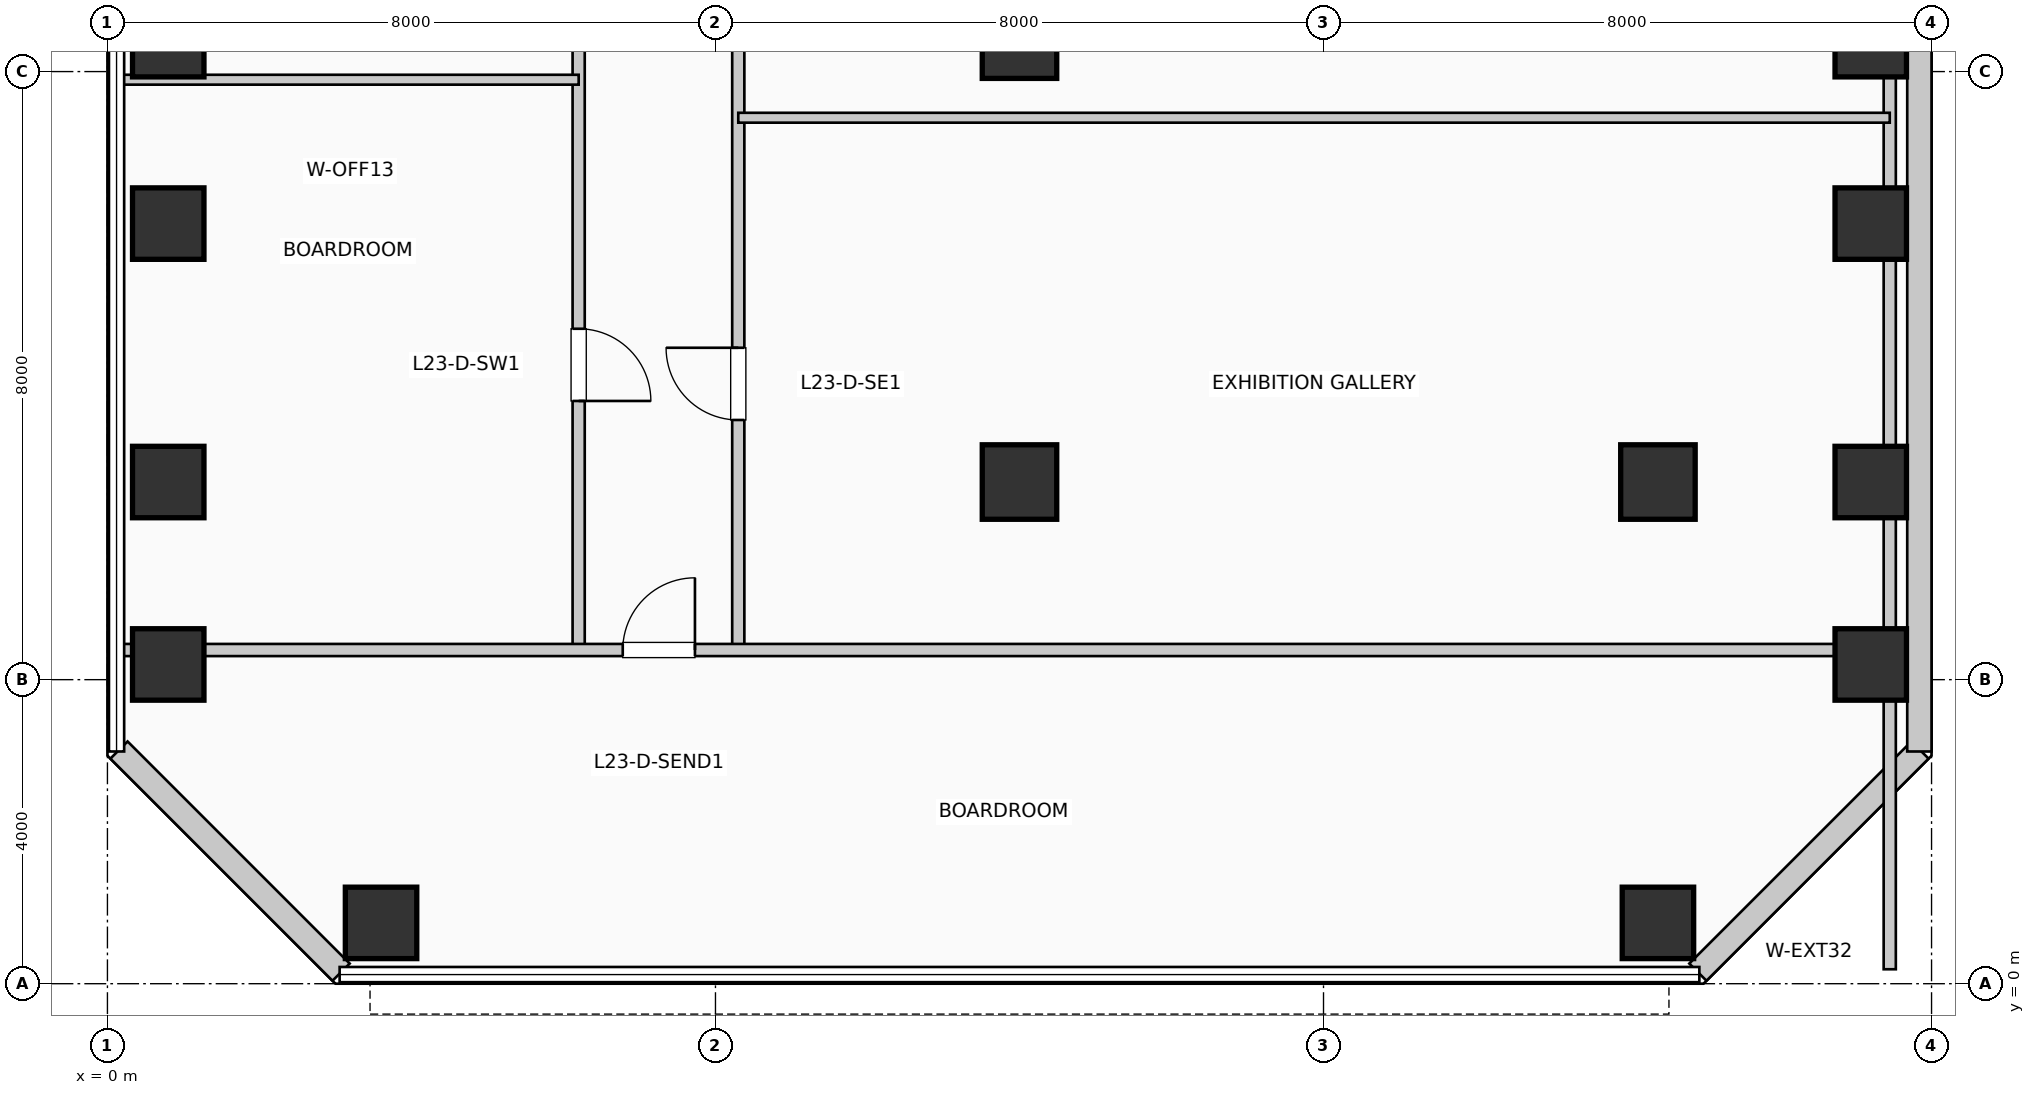
"""IFC4 building model, lengths in metres.
Left out: names, types, materials, properties, quantities, classifications, styles, units other than length and angle.
Written with IfcOpenShell. Run it as: python <this file> out.ifc"""

import sys

from ifc_helpers import new_model, si_unit, direction, frame, frame_2d, origin, origin_2d, place, context, subcontext, project, spatial, rectangle, extrude, element, fill, save


model = new_model("IFC4")
c1 = context("Model", 3, precision=1e-05, world=origin(), true_north=direction((0.0, 1.0)))
c2 = subcontext(c1, "Body", "Model", "MODEL_VIEW")
j1 = project(units=[si_unit("LENGTHUNIT", "METRE"), si_unit("PLANEANGLEUNIT", "RADIAN")], contexts=[c1])
p1 = place(None, origin())
s1 = spatial("IfcSite", under=j1, at=p1, CompositionType="ELEMENT")
p2 = place(p1, origin())
s2 = spatial("IfcBuilding", under=s1, at=p2, CompositionType="ELEMENT")
p3 = place(p2, frame((0.0, 0.0, 98.67)))
s3 = spatial("IfcBuildingStorey", under=s2, at=p3, CompositionType="ELEMENT", Elevation=98.67)
for number, where, z_axis, x_axis in (
    (1, (0.8, 4.2, 0.0), (0.0, 0.0, 1.0), (1.0, 0.0, 0.0)),
    (2, (0.8, 6.6, 0.0), (0.0, 0.0, 1.0), (1.0, 0.0, 0.0)),
    (3, (0.8, 10.0, 0.0), (0.0, 0.0, 1.0), (1.0, 0.0, 0.0)),
    (4, (0.8, 12.4, 0.0), (0.0, 0.0, 1.0), (1.0, 0.0, 0.0)),
    (5, (3.6, 0.8, 0.0), (0.0, 0.0, 1.0), (1.0, 0.0, 0.0)),
):
    element("IfcColumn", number, at=place(p3, frame(where, z_axis=z_axis, x_axis=x_axis)), inside=s3, PredefinedType="COLUMN", context=c2, shape_type="SweptSolid", body=[
        extrude(rectangle(XDim=0.94, YDim=0.94, at=origin_2d()), origin(), (0.0, 0.0, 1.0), 3.96),
    ])
for number, where, z_axis, x_axis in (
    (6, (12.0, 6.6, 0.0), (0.0, 0.0, 1.0), (1.0, 0.0, 0.0)),
    (7, (12.0, 12.4, 0.0), (0.0, 0.0, 1.0), (1.0, 0.0, 0.0)),
):
    element("IfcColumn", number, at=place(p3, frame(where, z_axis=z_axis, x_axis=x_axis)), inside=s3, PredefinedType="COLUMN", context=c2, shape_type="SweptSolid", body=[
        extrude(rectangle(XDim=0.98, YDim=0.98, at=origin_2d()), origin(), (0.0, 0.0, 1.0), 3.96),
    ])
p4 = place(p3, frame((20.4, 0.8, 0.0), z_axis=(0.0, 0.0, 1.0), x_axis=(1.0, 0.0, 0.0)))
e8 = element("IfcColumn", 8, at=p4, inside=s3, PredefinedType="COLUMN", context=c2, shape_type="SweptSolid", body=[
    extrude(rectangle(XDim=0.94, YDim=0.94, at=origin_2d()), origin(), (0.0, 0.0, 1.0), 3.96),
])
p5 = place(p3, frame((20.4, 6.6, 0.0), z_axis=(0.0, 0.0, 1.0), x_axis=(1.0, 0.0, 0.0)))
e9 = element("IfcColumn", 9, at=p5, inside=s3, PredefinedType="COLUMN", context=c2, shape_type="SweptSolid", body=[
    extrude(rectangle(XDim=0.98, YDim=0.98, at=origin_2d()), origin(), (0.0, 0.0, 1.0), 3.96),
])
for number, where, z_axis, x_axis in (
    (10, (23.2, 4.2, 0.0), (0.0, 0.0, 1.0), (1.0, 0.0, 0.0)),
    (11, (23.2, 6.6, 0.0), (0.0, 0.0, 1.0), (1.0, 0.0, 0.0)),
    (12, (23.2, 10.0, 0.0), (0.0, 0.0, 1.0), (1.0, 0.0, 0.0)),
    (13, (23.2, 12.4, 0.0), (0.0, 0.0, 1.0), (1.0, 0.0, 0.0)),
):
    element("IfcColumn", number, at=place(p3, frame(where, z_axis=z_axis, x_axis=x_axis)), inside=s3, PredefinedType="COLUMN", context=c2, shape_type="SweptSolid", body=[
        extrude(rectangle(XDim=0.94, YDim=0.94, at=origin_2d()), origin(), (0.0, 0.0, 1.0), 3.96),
    ])
p6 = place(p3, frame((20.926, 0.152, 0.0), z_axis=(0.0, 0.0, 1.0), x_axis=(0.707106781187, 0.707106781187, 0.0)))
e14 = element("IfcWall", 14, at=p6, inside=s3, PredefinedType="SOLIDWALL", context=c2, shape_type="SweptSolid", body=[
    extrude(rectangle(XDim=4.133, YDim=0.32, at=frame_2d((2.066, 0.0))), origin(), (0.0, 0.0, 1.0), 3.71),
])
p7 = place(p3, frame((23.84, 3.055, 0.0), z_axis=(0.0, 0.0, 1.0), x_axis=(0.0, 1.0, 0.0)))
e15 = element("IfcWall", 15, at=p7, inside=s3, PredefinedType="SOLIDWALL", context=c2, shape_type="SweptSolid", body=[
    extrude(rectangle(XDim=12.89, YDim=0.32, at=frame_2d((6.445, 0.0))), origin(), (0.0, 0.0, 1.0), 3.71),
])
p8 = place(p3, frame((0.152, 3.074, 0.0), z_axis=(0.0, 0.0, 1.0), x_axis=(0.707106781187, -0.707106781187, 0.0)))
e16 = element("IfcWall", 16, at=p8, inside=s3, PredefinedType="SOLIDWALL", context=c2, shape_type="SweptSolid", body=[
    extrude(rectangle(XDim=4.133, YDim=0.32, at=frame_2d((2.066, 0.0))), origin(), (0.0, 0.0, 1.0), 3.71),
])
p9 = place(p3, frame((6.2, 4.39, 0.0), z_axis=(0.0, 0.0, 1.0), x_axis=(0.0, 1.0, 0.0)))
e17 = element("IfcWall", 17, at=p9, inside=s3, PredefinedType="PARTITIONING", context=c2, shape_type="SweptSolid", body=[
    extrude(rectangle(XDim=25.01, YDim=0.16, at=frame_2d((12.505, 0.0))), origin(), (0.0, 0.0, 1.0), 3.71),
])
p10 = place(p9, frame((4.227, 0.0, 0.0), z_axis=(0.0, 0.0, 1.0), x_axis=(-1.0, 0.0, 0.0)))
e18 = element("IfcOpeningElement", 18, at=p10, cuts=e17, PredefinedType="OPENING", context=c2, shape_type="SweptSolid", body=[
    extrude(rectangle(XDim=0.95, YDim=2.15, at=frame_2d((0.475, 1.075))), frame((0.0, 0.09, 0.0), z_axis=(0.0, -1.0, 0.0), x_axis=(1.0, 0.0, 0.0)), (0.0, 0.0, 1.0), 0.18),
])
p11 = place(p9, frame((11.979, 0.0, 0.0), z_axis=(0.0, 0.0, 1.0), x_axis=(-1.0, 0.0, 0.0)))
e19 = element("IfcOpeningElement", 19, at=p11, cuts=e17, PredefinedType="OPENING", context=c2, shape_type="SweptSolid", body=[
    extrude(rectangle(XDim=0.95, YDim=2.15, at=frame_2d((0.475, 1.075))), frame((0.0, 0.09, 0.0), z_axis=(0.0, -1.0, 0.0), x_axis=(1.0, 0.0, 0.0)), (0.0, 0.0, 1.0), 0.18),
])
p12 = place(p9, frame((20.733, 0.0, 0.0), z_axis=(0.0, 0.0, 1.0), x_axis=(-1.0, 0.0, 0.0)))
e20 = element("IfcOpeningElement", 20, at=p12, cuts=e17, PredefinedType="OPENING", context=c2, shape_type="SweptSolid", body=[
    extrude(rectangle(XDim=0.95, YDim=2.15, at=frame_2d((0.475, 1.075))), frame((0.0, 0.09, 0.0), z_axis=(0.0, -1.0, 0.0), x_axis=(1.0, 0.0, 0.0)), (0.0, 0.0, 1.0), 0.18),
])
p13 = place(p3, frame((8.3, 4.39, 0.0), z_axis=(0.0, 0.0, 1.0), x_axis=(0.0, 1.0, 0.0)))
e21 = element("IfcWall", 21, at=p13, inside=s3, PredefinedType="PARTITIONING", context=c2, shape_type="SweptSolid", body=[
    extrude(rectangle(XDim=25.01, YDim=0.16, at=frame_2d((12.505, 0.0))), origin(), (0.0, 0.0, 1.0), 3.71),
])
p14 = place(p13, frame((3.026, 0.0, 0.0)))
e22 = element("IfcOpeningElement", 22, at=p14, cuts=e21, PredefinedType="OPENING", context=c2, shape_type="SweptSolid", body=[
    extrude(rectangle(XDim=0.95, YDim=2.15, at=frame_2d((0.475, 1.075))), frame((0.0, 0.09, 0.0), z_axis=(0.0, -1.0, 0.0), x_axis=(1.0, 0.0, 0.0)), (0.0, 0.0, 1.0), 0.18),
])
p15 = place(p13, frame((10.529, 0.0, 0.0)))
e23 = element("IfcOpeningElement", 23, at=p15, cuts=e21, PredefinedType="OPENING", context=c2, shape_type="SweptSolid", body=[
    extrude(rectangle(XDim=0.95, YDim=2.15, at=frame_2d((0.475, 1.075))), frame((0.0, 0.09, 0.0), z_axis=(0.0, -1.0, 0.0), x_axis=(1.0, 0.0, 0.0)), (0.0, 0.0, 1.0), 0.18),
])
p16 = place(p13, frame((19.533, 0.0, 0.0)))
e24 = element("IfcOpeningElement", 24, at=p16, cuts=e21, PredefinedType="OPENING", context=c2, shape_type="SweptSolid", body=[
    extrude(rectangle(XDim=0.95, YDim=2.15, at=frame_2d((0.475, 1.075))), frame((0.0, 0.09, 0.0), z_axis=(0.0, -1.0, 0.0), x_axis=(1.0, 0.0, 0.0)), (0.0, 0.0, 1.0), 0.18),
])
p17 = place(p3, frame((0.19, 4.39, 0.0), z_axis=(0.0, 0.0, 1.0), x_axis=(1.0, 0.0, 0.0)))
e25 = element("IfcWall", 25, at=p17, inside=s3, PredefinedType="PARTITIONING", context=c2, shape_type="SweptSolid", body=[
    extrude(rectangle(XDim=23.26, YDim=0.16, at=frame_2d((11.63, 0.0))), origin(), (0.0, 0.0, 1.0), 2.995),
])
p18 = place(p17, frame((6.59, 0.0, 0.0)))
e26 = element("IfcOpeningElement", 26, at=p18, cuts=e25, PredefinedType="OPENING", context=c2, shape_type="SweptSolid", body=[
    extrude(rectangle(XDim=0.95, YDim=2.15, at=frame_2d((0.475, 1.075))), frame((0.0, 0.09, 0.0), z_axis=(0.0, -1.0, 0.0), x_axis=(1.0, 0.0, 0.0)), (0.0, 0.0, 1.0), 0.18),
])
p19 = place(p3, frame((23.45, 0.19, 0.0), z_axis=(0.0, 0.0, 1.0), x_axis=(0.0, 1.0, 0.0)))
e27 = element("IfcWall", 27, at=p19, inside=s3, PredefinedType="PARTITIONING", context=c2, shape_type="SweptSolid", body=[
    extrude(rectangle(XDim=29.21, YDim=0.16, at=frame_2d((14.605, 0.0))), origin(), (0.0, 0.0, 1.0), 2.995),
])
p20 = place(p3, frame((0.19, 11.893, 0.0), z_axis=(0.0, 0.0, 1.0), x_axis=(1.0, 0.0, 0.0)))
e28 = element("IfcWall", 28, at=p20, inside=s3, PredefinedType="PARTITIONING", context=c2, shape_type="SweptSolid", body=[
    extrude(rectangle(XDim=6.01, YDim=0.13, at=frame_2d((3.005, 0.0))), origin(), (0.0, 0.0, 1.0), 3.71),
])
p21 = place(p3, frame((8.3, 11.393, 0.0), z_axis=(0.0, 0.0, 1.0), x_axis=(1.0, 0.0, 0.0)))
e29 = element("IfcWall", 29, at=p21, inside=s3, PredefinedType="PARTITIONING", context=c2, shape_type="SweptSolid", body=[
    extrude(rectangle(XDim=15.15, YDim=0.13, at=frame_2d((7.575, 0.0))), origin(), (0.0, 0.0, 1.0), 3.71),
])
p22 = place(p18, origin())
e30 = element("IfcDoor", 30, at=p22, inside=s3, OperationType="SINGLE_SWING_RIGHT", PredefinedType="DOOR", context=c2, shape_type="SweptSolid", body=[
    extrude(rectangle(XDim=0.95, YDim=2.15, at=frame_2d((0.475, 1.075))), frame((0.0, 0.025, 0.0), z_axis=(0.0, -1.0, 0.0), x_axis=(1.0, 0.0, 0.0)), (0.0, 0.0, 1.0), 0.05),
])
fill(e26, e30)
p23 = place(p10, origin())
e31 = element("IfcDoor", 31, at=p23, inside=s3, OperationType="SINGLE_SWING_LEFT", PredefinedType="DOOR", context=c2, shape_type="SweptSolid", body=[
    extrude(rectangle(XDim=0.95, YDim=2.15, at=frame_2d((0.475, 1.075))), frame((0.0, 0.025, 0.0), z_axis=(0.0, -1.0, 0.0), x_axis=(1.0, 0.0, 0.0)), (0.0, 0.0, 1.0), 0.05),
])
fill(e18, e31)
p24 = place(p14, origin())
e32 = element("IfcDoor", 32, at=p24, inside=s3, OperationType="SINGLE_SWING_RIGHT", PredefinedType="DOOR", context=c2, shape_type="SweptSolid", body=[
    extrude(rectangle(XDim=0.95, YDim=2.15, at=frame_2d((0.475, 1.075))), frame((0.0, 0.025, 0.0), z_axis=(0.0, -1.0, 0.0), x_axis=(1.0, 0.0, 0.0)), (0.0, 0.0, 1.0), 0.05),
])
fill(e22, e32)
save(model, sys.argv[1])
